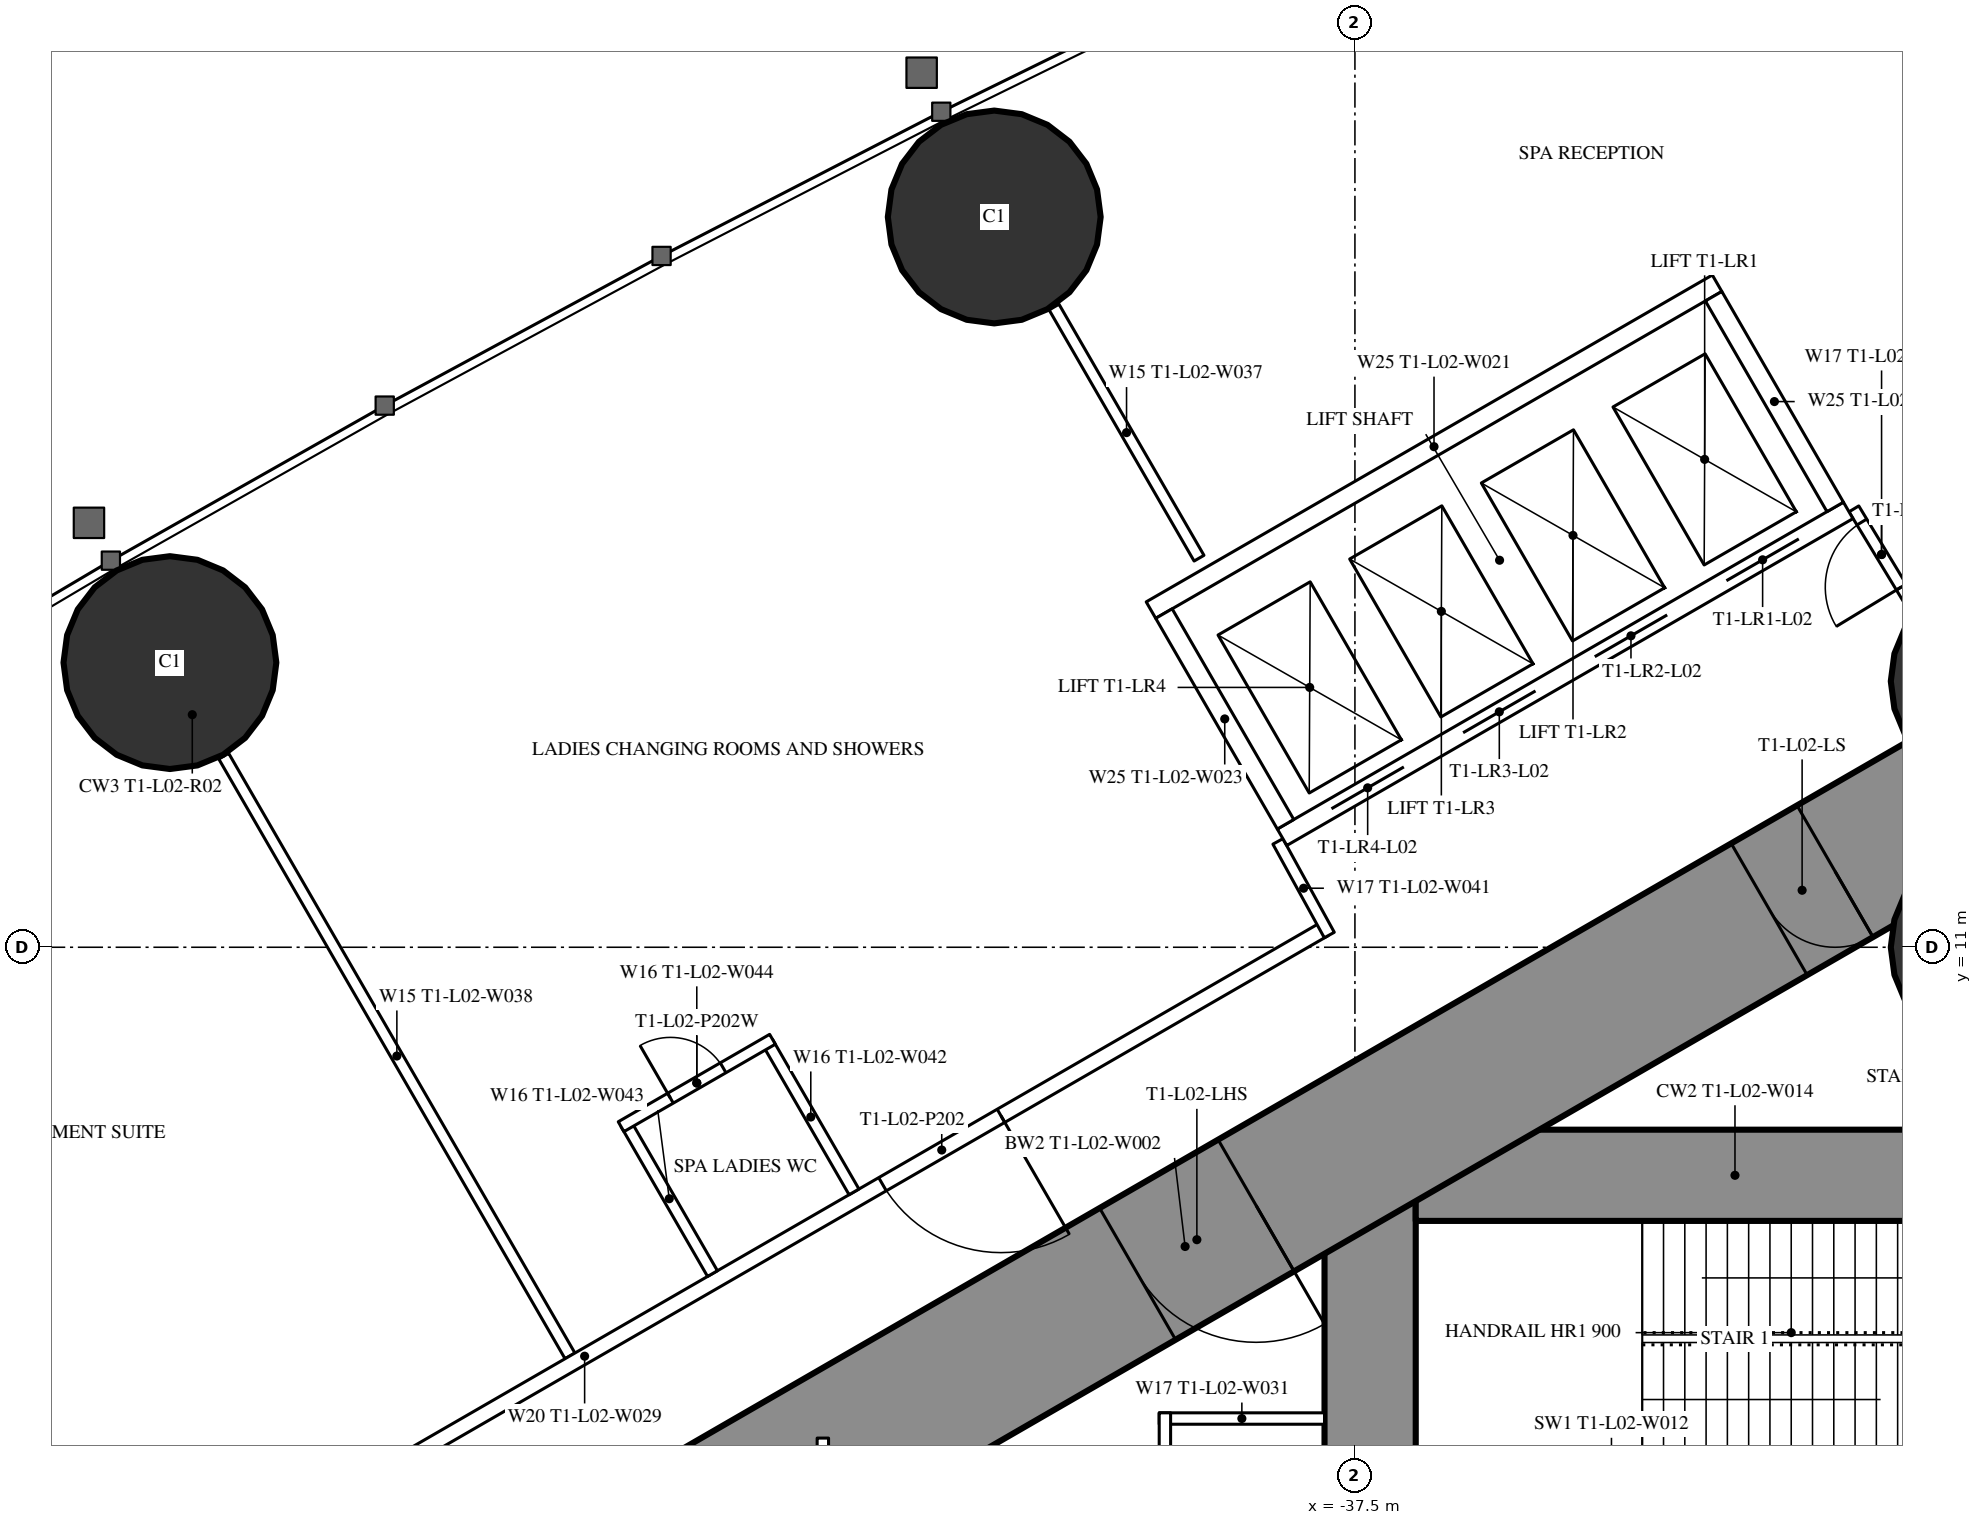
"""IFC4 building model, lengths in metres.
Left out: names, types, materials, properties, quantities, classifications, styles, units other than length and angle.
Written with IfcOpenShell. Run it as: python <this file> out.ifc"""

import sys

from ifc_helpers import new_model, si_unit, direction, frame, frame_2d, origin, origin_2d, place, context, subcontext, project, spatial, rectangle, hollow_circle, extrude, element, fill, save


model = new_model("IFC4")
c1 = context("Model", 3, precision=1e-05, world=origin(), true_north=direction((0.0, 1.0)))
c2 = subcontext(c1, "Body", "Model", "MODEL_VIEW")
j1 = project(units=[si_unit("LENGTHUNIT", "METRE"), si_unit("PLANEANGLEUNIT", "RADIAN")], contexts=[c1])
p1 = place(None, origin())
s1 = spatial("IfcSite", under=j1, at=p1, CompositionType="ELEMENT")
p2 = place(p1, origin())
s2 = spatial("IfcBuilding", under=s1, at=p2, CompositionType="ELEMENT")
p3 = place(p2, frame((0.0, 0.0, 12.6)))
s3 = spatial("IfcBuildingStorey", under=s2, at=p3, CompositionType="ELEMENT", Elevation=12.6)
for number, where, z_axis, x_axis in (
    (1, (-29.05, 11.0, 0.0), (0.0, 0.0, 1.0), (1.0, 0.0, 0.0)),
    (2, (-29.05, 14.5, 0.0), (0.0, 0.0, 1.0), (1.0, 0.0, 0.0)),
    (3, (-42.245, 20.607, 0.0), (0.0, 0.0, 1.0), (1.0, 0.0, 0.0)),
    (4, (-53.09, 14.745, 0.0), (0.0, 0.0, 1.0), (1.0, 0.0, 0.0)),
):
    element("IfcColumn", number, at=place(p3, frame(where, z_axis=z_axis, x_axis=x_axis)), inside=s3, PredefinedType="COLUMN", context=c2, shape_type="SweptSolid", body=[
        extrude(hollow_circle(Radius=1.4, WallThickness=0.12, at=origin_2d()), origin(), (0.0, 0.0, 1.0), 5.4),
    ])
p4 = place(p3, frame((-37.3, 8.6, 0.0), z_axis=(0.0, 0.0, 1.0), x_axis=(0.0, -1.0, 0.0)))
e5 = element("IfcWall", 5, at=p4, inside=s3, PredefinedType="SHEAR", context=c2, shape_type="SweptSolid", body=[
    extrude(rectangle(XDim=17.2, YDim=1.2, at=frame_2d((8.6, 0.0))), origin(), (0.0, 0.0, 1.0), 5.4),
])
p5 = place(p4, frame((7.7, 0.0, 0.0)))
e6 = element("IfcOpeningElement", 6, at=p5, cuts=e5, PredefinedType="OPENING", context=c2, shape_type="SweptSolid", body=[
    extrude(rectangle(XDim=1.8, YDim=2.2, at=frame_2d((0.9, 1.1))), frame((0.0, 0.61, 0.0), z_axis=(0.0, -1.0, 0.0), x_axis=(1.0, 0.0, 0.0)), (0.0, 0.0, 1.0), 1.22),
])
p6 = place(p3, frame((-28.3, 8.0, 0.0), z_axis=(0.0, 0.0, 1.0), x_axis=(-1.0, 0.0, 0.0)))
e7 = element("IfcWall", 7, at=p6, inside=s3, PredefinedType="SHEAR", context=c2, shape_type="SweptSolid", body=[
    extrude(rectangle(XDim=8.4, YDim=1.2, at=frame_2d((4.2, 0.0))), origin(), (0.0, 0.0, 1.0), 5.4),
])
p7 = place(p6, frame((0.25, 0.0, 0.0)))
e8 = element("IfcOpeningElement", 8, at=p7, cuts=e7, PredefinedType="OPENING", context=c2, shape_type="SweptSolid", body=[
    extrude(rectangle(XDim=1.0, YDim=2.2, at=frame_2d((0.5, 1.1))), frame((0.0, 0.61, 0.0), z_axis=(0.0, -1.0, 0.0), x_axis=(1.0, 0.0, 0.0)), (0.0, 0.0, 1.0), 1.22),
])
p8 = place(p3, frame((-27.2, 14.3, 0.0), z_axis=(0.0, 0.0, 1.0), x_axis=(-0.866026593062, -0.499997940104, 0.0)))
e9 = element("IfcWall", 9, at=p8, inside=s3, PredefinedType="SHEAR", context=c2, shape_type="SweptSolid", body=[
    extrude(rectangle(XDim=28.946, YDim=2.0, at=frame_2d((14.473, 0.0))), origin(), (0.0, 0.0, 1.0), 5.4),
])
p9 = place(p8, frame((4.6, 0.0, 0.0)))
e10 = element("IfcOpeningElement", 10, at=p9, cuts=e9, PredefinedType="OPENING", context=c2, shape_type="SweptSolid", body=[
    extrude(rectangle(XDim=1.0, YDim=2.2, at=frame_2d((0.5, 1.1))), frame((0.0, 1.01, 0.0), z_axis=(0.0, -1.0, 0.0), x_axis=(1.0, 0.0, 0.0)), (0.0, 0.0, 1.0), 2.02),
])
p10 = place(p8, frame((13.395, 0.0, 0.0)))
e11 = element("IfcOpeningElement", 11, at=p10, cuts=e9, PredefinedType="OPENING", context=c2, shape_type="SweptSolid", body=[
    extrude(rectangle(XDim=1.8, YDim=2.2, at=frame_2d((0.9, 1.1))), frame((0.0, 1.01, 0.0), z_axis=(0.0, -1.0, 0.0), x_axis=(1.0, 0.0, 0.0)), (0.0, 0.0, 1.0), 2.02),
])
p11 = place(p3, frame((-47.827, 5.624, 0.0), z_axis=(0.0, 0.0, 1.0), x_axis=(-0.499995404498, 0.866028056982, 0.0)))
e12 = element("IfcWall", 12, at=p11, inside=s3, PredefinedType="PARTITIONING", context=c2, shape_type="SweptSolid", body=[
    extrude(rectangle(XDim=9.11, YDim=0.15, at=frame_2d((4.555, 0.0))), origin(), (0.0, 0.0, 1.0), 4.15),
])
p12 = place(p3, frame((-39.551, 16.119, 0.0), z_axis=(0.0, 0.0, 1.0), x_axis=(-0.500014214979, 0.866017196607, 0.0)))
e13 = element("IfcWall", 13, at=p12, inside=s3, PredefinedType="PARTITIONING", context=c2, shape_type="SweptSolid", body=[
    extrude(rectangle(XDim=3.815, YDim=0.15, at=frame_2d((1.907, 0.0))), origin(), (0.0, 0.0, 1.0), 5.15),
])
p13 = place(p3, frame((-27.5, 17.244, 0.0), z_axis=(0.0, 0.0, 1.0), x_axis=(-0.866039316896, -0.499975901009, 0.0)))
e14 = element("IfcWall", 14, at=p13, inside=s3, PredefinedType="PARTITIONING", context=c2, shape_type="SweptSolid", body=[
    extrude(rectangle(XDim=3.169, YDim=0.2, at=frame_2d((1.584, 0.0))), origin(), (0.0, 0.0, 1.0), 4.25),
])
p14 = place(p3, frame((-37.9, 11.24, 0.0), z_axis=(0.0, 0.0, 1.0), x_axis=(-0.866022995118, -0.50000417191, 0.0)))
e15 = element("IfcWall", 15, at=p14, inside=s3, PredefinedType="PARTITIONING", context=c2, shape_type="SweptSolid", body=[
    extrude(rectangle(XDim=22.48, YDim=0.2, at=frame_2d((11.24, 0.0))), origin(), (0.0, 0.0, 1.0), 4.25),
])
p15 = place(p14, frame((14.644, 0.0, 0.0)))
e16 = element("IfcOpeningElement", 16, at=p15, cuts=e15, PredefinedType="OPENING", context=c2, shape_type="SweptSolid", body=[
    extrude(rectangle(XDim=1.8, YDim=2.2, at=frame_2d((0.9, 1.1))), frame((0.0, 0.11, 0.0), z_axis=(0.0, -1.0, 0.0), x_axis=(1.0, 0.0, 0.0)), (0.0, 0.0, 1.0), 0.22),
])
p16 = place(p14, frame((20.069, 0.0, 0.0)))
e17 = element("IfcOpeningElement", 17, at=p16, cuts=e15, PredefinedType="OPENING", context=c2, shape_type="SweptSolid", body=[
    extrude(rectangle(XDim=1.8, YDim=2.2, at=frame_2d((0.9, 1.1))), frame((0.0, 0.11, 0.0), z_axis=(0.0, -1.0, 0.0), x_axis=(1.0, 0.0, 0.0)), (0.0, 0.0, 1.0), 0.22),
])
p17 = place(p14, frame((4.915, 0.0, 0.0)))
e18 = element("IfcOpeningElement", 18, at=p17, cuts=e15, PredefinedType="OPENING", context=c2, shape_type="SweptSolid", body=[
    extrude(rectangle(XDim=1.8, YDim=2.2, at=frame_2d((0.9, 1.1))), frame((0.0, 0.11, 0.0), z_axis=(0.0, -1.0, 0.0), x_axis=(1.0, 0.0, 0.0)), (0.0, 0.0, 1.0), 0.22),
])
p18 = place(p3, frame((-30.207, 15.566, 0.0), z_axis=(0.0, 0.0, 1.0), x_axis=(-0.518374889333, 0.855153479855, 0.0)))
e19 = element("IfcWall", 19, at=p18, inside=s3, PredefinedType="PARTITIONING", context=c2, shape_type="SweptSolid", body=[
    extrude(rectangle(XDim=1.405, YDim=0.15, at=frame_2d((0.703, 0.0))), origin(), (0.0, 0.0, 1.0), 5.15),
])
p19 = place(p18, frame((0.202, 0.0, 0.0)))
e20 = element("IfcOpeningElement", 20, at=p19, cuts=e19, PredefinedType="OPENING", context=c2, shape_type="SweptSolid", body=[
    extrude(rectangle(XDim=1.0, YDim=2.2, at=frame_2d((0.5, 1.1))), frame((0.0, 0.085, 0.0), z_axis=(0.0, -1.0, 0.0), x_axis=(1.0, 0.0, 0.0)), (0.0, 0.0, 1.0), 0.17),
])
p20 = place(p3, frame((-38.513, 12.392, 0.0), z_axis=(0.0, 0.0, 1.0), x_axis=(0.481358300093, -0.876523922624, 0.0)))
e21 = element("IfcWall", 21, at=p20, inside=s3, PredefinedType="PARTITIONING", context=c2, shape_type="SweptSolid", body=[
    extrude(rectangle(XDim=1.405, YDim=0.15, at=frame_2d((0.703, 0.0))), origin(), (0.0, 0.0, 1.0), 5.15),
])
p21 = place(p3, frame((-37.9, 4.8, 0.0), z_axis=(0.0, 0.0, 1.0), x_axis=(-1.0, 0.0, 0.0)))
e22 = element("IfcWall", 22, at=p21, inside=s3, PredefinedType="PARTITIONING", context=c2, shape_type="SweptSolid", body=[
    extrude(rectangle(XDim=2.175, YDim=0.15, at=frame_2d((1.087, 0.0))), origin(), (0.0, 0.0, 1.0), 5.15),
])
p22 = place(p3, frame((-40.0, 4.875, 0.0), z_axis=(0.0, 0.0, 1.0), x_axis=(0.0, -1.0, 0.0)))
e23 = element("IfcWall", 23, at=p22, inside=s3, PredefinedType="PARTITIONING", context=c2, shape_type="SweptSolid", body=[
    extrude(rectangle(XDim=3.75, YDim=0.15, at=frame_2d((1.875, 0.0))), origin(), (0.0, 0.0, 1.0), 5.15),
])
p23 = place(p22, frame((1.375, 0.0, 0.0)))
e24 = element("IfcOpeningElement", 24, at=p23, cuts=e23, PredefinedType="OPENING", context=c2, shape_type="SweptSolid", body=[
    extrude(rectangle(XDim=1.0, YDim=2.2, at=frame_2d((0.5, 1.1))), frame((0.0, 0.085, 0.0), z_axis=(0.0, -1.0, 0.0), x_axis=(1.0, 0.0, 0.0)), (0.0, 0.0, 1.0), 0.17),
])
p24 = place(p3, frame((-44.5, 4.543, 0.0), z_axis=(0.0, 0.0, 1.0), x_axis=(0.0, -1.0, 0.0)))
e25 = element("IfcWall", 25, at=p24, inside=s3, PredefinedType="PARTITIONING", context=c2, shape_type="SweptSolid", body=[
    extrude(rectangle(XDim=9.085, YDim=0.15, at=frame_2d((4.543, 0.0))), origin(), (0.0, 0.0, 1.0), 5.15),
])
p25 = place(p24, frame((1.771, 0.0, 0.0)))
e26 = element("IfcOpeningElement", 26, at=p25, cuts=e25, PredefinedType="OPENING", context=c2, shape_type="SweptSolid", body=[
    extrude(rectangle(XDim=1.0, YDim=2.2, at=frame_2d((0.5, 1.1))), frame((0.0, 0.085, 0.0), z_axis=(0.0, -1.0, 0.0), x_axis=(1.0, 0.0, 0.0)), (0.0, 0.0, 1.0), 0.17),
])
p26 = place(p24, frame((6.314, 0.0, 0.0)))
e27 = element("IfcOpeningElement", 27, at=p26, cuts=e25, PredefinedType="OPENING", context=c2, shape_type="SweptSolid", body=[
    extrude(rectangle(XDim=1.0, YDim=2.2, at=frame_2d((0.5, 1.1))), frame((0.0, 0.085, 0.0), z_axis=(0.0, -1.0, 0.0), x_axis=(1.0, 0.0, 0.0)), (0.0, 0.0, 1.0), 0.17),
])
p27 = place(p3, frame((-44.09, 7.782, 0.0), z_axis=(0.0, 0.0, 1.0), x_axis=(-0.499982560684, 0.866035472144, 0.0)))
e28 = element("IfcWall", 28, at=p27, inside=s3, PredefinedType="PARTITIONING", context=c2, shape_type="SweptSolid", body=[
    extrude(rectangle(XDim=2.275, YDim=0.15, at=frame_2d((1.137, 0.0))), origin(), (0.0, 0.0, 1.0), 5.15),
])
p28 = place(p3, frame((-45.952, 6.707, 0.0), z_axis=(0.0, 0.0, 1.0), x_axis=(-0.500063042646, 0.865989003036, 0.0)))
e29 = element("IfcWall", 29, at=p28, inside=s3, PredefinedType="PARTITIONING", context=c2, shape_type="SweptSolid", body=[
    extrude(rectangle(XDim=2.275, YDim=0.15, at=frame_2d((1.138, 0.0))), origin(), (0.0, 0.0, 1.0), 5.15),
])
p29 = place(p3, frame((-45.163, 9.789, 0.0), z_axis=(0.0, 0.0, 1.0), x_axis=(-0.866053019151, -0.499952165731, 0.0)))
e30 = element("IfcWall", 30, at=p29, inside=s3, PredefinedType="PARTITIONING", context=c2, shape_type="SweptSolid", body=[
    extrude(rectangle(XDim=2.3, YDim=0.15, at=frame_2d((1.15, 0.0))), origin(), (0.0, 0.0, 1.0), 5.15),
])
p30 = place(p29, frame((0.75, 0.0, 0.0)))
e31 = element("IfcOpeningElement", 31, at=p30, cuts=e30, PredefinedType="OPENING", context=c2, shape_type="SweptSolid", body=[
    extrude(rectangle(XDim=0.8, YDim=2.2, at=frame_2d((0.4, 1.1))), frame((0.0, 0.085, 0.0), z_axis=(0.0, -1.0, 0.0), x_axis=(1.0, 0.0, 0.0)), (0.0, 0.0, 1.0), 0.17),
])
p31 = place(p3, frame((-31.01, 16.747, 0.0), z_axis=(0.0, 0.0, 1.0), x_axis=(-0.866028165386, -0.499995216735, 0.0)))
e32 = element("IfcWall", 32, at=p31, inside=s3, PredefinedType="PARTITIONING", context=c2, shape_type="SweptSolid", body=[
    extrude(rectangle(XDim=8.6, YDim=0.25, at=frame_2d((4.3, 0.0))), origin(), (0.0, 0.0, 1.0), 5.15),
])
p32 = place(p31, frame((0.75, 0.0, 0.0)))
e33 = element("IfcOpeningElement", 33, at=p32, cuts=e32, PredefinedType="OPENING", context=c2, shape_type="SweptSolid", body=[
    extrude(rectangle(XDim=1.1, YDim=2.2, at=frame_2d((0.55, 1.1))), frame((0.0, 0.135, 0.0), z_axis=(0.0, -1.0, 0.0), x_axis=(1.0, 0.0, 0.0)), (0.0, 0.0, 1.0), 0.27),
])
p33 = place(p31, frame((2.75, 0.0, 0.0)))
e34 = element("IfcOpeningElement", 34, at=p33, cuts=e32, PredefinedType="OPENING", context=c2, shape_type="SweptSolid", body=[
    extrude(rectangle(XDim=1.1, YDim=2.2, at=frame_2d((0.55, 1.1))), frame((0.0, 0.135, 0.0), z_axis=(0.0, -1.0, 0.0), x_axis=(1.0, 0.0, 0.0)), (0.0, 0.0, 1.0), 0.27),
])
p34 = place(p31, frame((4.75, 0.0, 0.0)))
e35 = element("IfcOpeningElement", 35, at=p34, cuts=e32, PredefinedType="OPENING", context=c2, shape_type="SweptSolid", body=[
    extrude(rectangle(XDim=1.1, YDim=2.2, at=frame_2d((0.55, 1.1))), frame((0.0, 0.135, 0.0), z_axis=(0.0, -1.0, 0.0), x_axis=(1.0, 0.0, 0.0)), (0.0, 0.0, 1.0), 0.27),
])
p35 = place(p31, frame((6.75, 0.0, 0.0)))
e36 = element("IfcOpeningElement", 36, at=p35, cuts=e32, PredefinedType="OPENING", context=c2, shape_type="SweptSolid", body=[
    extrude(rectangle(XDim=1.1, YDim=2.2, at=frame_2d((0.55, 1.1))), frame((0.0, 0.135, 0.0), z_axis=(0.0, -1.0, 0.0), x_axis=(1.0, 0.0, 0.0)), (0.0, 0.0, 1.0), 0.27),
])
p36 = place(p3, frame((-32.736, 19.736, 0.0), z_axis=(0.0, 0.0, 1.0), x_axis=(-0.866028165386, -0.499995216735, 0.0)))
e37 = element("IfcWall", 37, at=p36, inside=s3, PredefinedType="PARTITIONING", context=c2, shape_type="SweptSolid", body=[
    extrude(rectangle(XDim=8.6, YDim=0.25, at=frame_2d((4.3, 0.0))), origin(), (0.0, 0.0, 1.0), 5.15),
])
p37 = place(p3, frame((-31.181, 16.793, 0.0), z_axis=(0.0, 0.0, 1.0), x_axis=(-0.499929347863, 0.866066190972, 0.0)))
e38 = element("IfcWall", 38, at=p37, inside=s3, PredefinedType="PARTITIONING", context=c2, shape_type="SweptSolid", body=[
    extrude(rectangle(XDim=3.201, YDim=0.25, at=frame_2d((1.6, 0.0))), origin(), (0.0, 0.0, 1.0), 5.15),
])
p38 = place(p3, frame((-38.413, 12.618, 0.0), z_axis=(0.0, 0.0, 1.0), x_axis=(-0.499872130319, 0.866099216793, 0.0)))
e39 = element("IfcWall", 39, at=p38, inside=s3, PredefinedType="PARTITIONING", context=c2, shape_type="SweptSolid", body=[
    extrude(rectangle(XDim=3.2, YDim=0.25, at=frame_2d((1.6, 0.0))), origin(), (0.0, 0.0, 1.0), 5.15),
])
p39 = place(p19, origin())
e40 = element("IfcDoor", 40, at=p39, inside=s3, OperationType="SINGLE_SWING_LEFT", PredefinedType="DOOR", context=c2, shape_type="SweptSolid", body=[
    extrude(rectangle(XDim=1.0, YDim=2.2, at=frame_2d((0.5, 1.1))), frame((0.0, 0.025, 0.0), z_axis=(0.0, -1.0, 0.0), x_axis=(1.0, 0.0, 0.0)), (0.0, 0.0, 1.0), 0.05),
])
fill(e20, e40)
p40 = place(p17, origin())
e41 = element("IfcDoor", 41, at=p40, inside=s3, OperationType="DOUBLE_DOOR_SINGLE_SWING", PredefinedType="DOOR", context=c2, shape_type="SweptSolid", body=[
    extrude(rectangle(XDim=1.8, YDim=2.2, at=frame_2d((0.9, 1.1))), frame((0.0, 0.025, 0.0), z_axis=(0.0, -1.0, 0.0), x_axis=(1.0, 0.0, 0.0)), (0.0, 0.0, 1.0), 0.05),
])
fill(e18, e41)
p41 = place(p9, origin())
e42 = element("IfcDoor", 42, at=p41, inside=s3, OperationType="SINGLE_SWING_LEFT", PredefinedType="DOOR", context=c2, shape_type="SweptSolid", body=[
    extrude(rectangle(XDim=1.0, YDim=2.2, at=frame_2d((0.5, 1.1))), frame((0.0, 0.025, 0.0), z_axis=(0.0, -1.0, 0.0), x_axis=(1.0, 0.0, 0.0)), (0.0, 0.0, 1.0), 0.05),
])
fill(e10, e42)
p42 = place(p10, origin())
e43 = element("IfcDoor", 43, at=p42, inside=s3, OperationType="DOUBLE_DOOR_SINGLE_SWING", PredefinedType="DOOR", context=c2, shape_type="SweptSolid", body=[
    extrude(rectangle(XDim=1.8, YDim=2.2, at=frame_2d((0.9, 1.1))), frame((0.0, 0.025, 0.0), z_axis=(0.0, -1.0, 0.0), x_axis=(1.0, 0.0, 0.0)), (0.0, 0.0, 1.0), 0.05),
])
fill(e11, e43)
p43 = place(p30, origin())
e44 = element("IfcDoor", 44, at=p43, inside=s3, OperationType="SINGLE_SWING_RIGHT", PredefinedType="DOOR", context=c2, shape_type="SweptSolid", body=[
    extrude(rectangle(XDim=0.8, YDim=2.2, at=frame_2d((0.4, 1.1))), frame((0.0, 0.025, 0.0), z_axis=(0.0, -1.0, 0.0), x_axis=(1.0, 0.0, 0.0)), (0.0, 0.0, 1.0), 0.05),
])
fill(e31, e44)
p44 = place(p32, origin())
e45 = element("IfcDoor", 45, at=p44, inside=s3, OperationType="DOUBLE_DOOR_SLIDING", PredefinedType="USERDEFINED", context=c2, shape_type="SweptSolid", body=[
    extrude(rectangle(XDim=1.1, YDim=2.2, at=frame_2d((0.55, 1.1))), frame((0.0, 0.025, 0.0), z_axis=(0.0, -1.0, 0.0), x_axis=(1.0, 0.0, 0.0)), (0.0, 0.0, 1.0), 0.05),
])
fill(e33, e45)
p45 = place(p33, origin())
e46 = element("IfcDoor", 46, at=p45, inside=s3, OperationType="DOUBLE_DOOR_SLIDING", PredefinedType="USERDEFINED", context=c2, shape_type="SweptSolid", body=[
    extrude(rectangle(XDim=1.1, YDim=2.2, at=frame_2d((0.55, 1.1))), frame((0.0, 0.025, 0.0), z_axis=(0.0, -1.0, 0.0), x_axis=(1.0, 0.0, 0.0)), (0.0, 0.0, 1.0), 0.05),
])
fill(e34, e46)
p46 = place(p34, origin())
e47 = element("IfcDoor", 47, at=p46, inside=s3, OperationType="DOUBLE_DOOR_SLIDING", PredefinedType="USERDEFINED", context=c2, shape_type="SweptSolid", body=[
    extrude(rectangle(XDim=1.1, YDim=2.2, at=frame_2d((0.55, 1.1))), frame((0.0, 0.025, 0.0), z_axis=(0.0, -1.0, 0.0), x_axis=(1.0, 0.0, 0.0)), (0.0, 0.0, 1.0), 0.05),
])
fill(e35, e47)
p47 = place(p35, origin())
e48 = element("IfcDoor", 48, at=p47, inside=s3, OperationType="DOUBLE_DOOR_SLIDING", PredefinedType="USERDEFINED", context=c2, shape_type="SweptSolid", body=[
    extrude(rectangle(XDim=1.1, YDim=2.2, at=frame_2d((0.55, 1.1))), frame((0.0, 0.025, 0.0), z_axis=(0.0, -1.0, 0.0), x_axis=(1.0, 0.0, 0.0)), (0.0, 0.0, 1.0), 0.05),
])
fill(e36, e48)
save(model, sys.argv[1])
